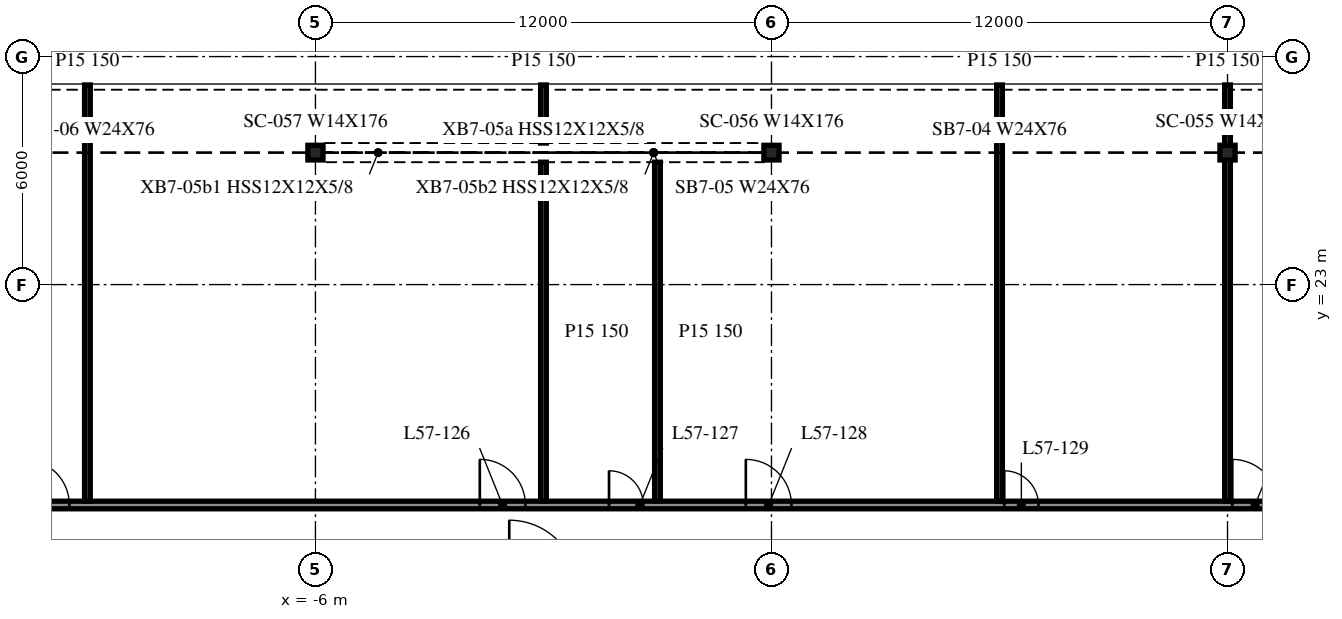
"""IFC4 building model, lengths in metres.
Left out: names, types, materials, properties, quantities, classifications, styles, units other than length and angle.
Written with IfcOpenShell. Run it as: python <this file> out.ifc"""

import sys

from ifc_helpers import new_model, si_unit, direction, frame, frame_2d, origin, origin_2d, place, context, subcontext, project, spatial, rectangle, i_section, extrude, element, fill, save


model = new_model("IFC4")
c1 = context("Model", 3, precision=1e-05, world=origin(), true_north=direction((0.0, 1.0)))
c2 = subcontext(c1, "Body", "Model", "MODEL_VIEW")
j1 = project(units=[si_unit("LENGTHUNIT", "METRE"), si_unit("PLANEANGLEUNIT", "RADIAN")], contexts=[c1])
p1 = place(None, origin())
s1 = spatial("IfcSite", under=j1, at=p1, CompositionType="ELEMENT")
p2 = place(p1, origin())
s2 = spatial("IfcBuilding", under=s1, at=p2, CompositionType="ELEMENT")
p3 = place(p2, frame((0.0, 0.0, 236.2)))
s3 = spatial("IfcBuildingStorey", under=s2, at=p3, CompositionType="ELEMENT", Elevation=236.2)
for number, where, z_axis, x_axis in (
    (1, (18.0, 26.473, -0.34), (0.0, 0.0, 1.0), (1.0, 0.0, 0.0)),
    (2, (6.0, 26.473, -0.34), (0.0, 0.0, 1.0), (1.0, 0.0, 0.0)),
    (3, (-6.0, 26.473, -0.34), (0.0, 0.0, 1.0), (1.0, 0.0, 0.0)),
):
    element("IfcColumn", number, at=place(p3, frame(where, z_axis=z_axis, x_axis=x_axis)), inside=s3, PredefinedType="COLUMN", context=c2, shape_type="SweptSolid", body=[
        extrude(i_section(OverallWidth=0.399, OverallDepth=0.386, WebThickness=0.021, FlangeThickness=0.033, at=origin_2d()), origin(), (0.0, 0.0, 1.0), 3.8),
    ])
p4 = place(p3, frame((-41.975, 17.2, 0.0), z_axis=(0.0, 0.0, 1.0), x_axis=(1.0, 0.0, 0.0)))
e4 = element("IfcWall", 4, at=p4, inside=s3, PredefinedType="PARTITIONING", context=c2, shape_type="SweptSolid", body=[
    extrude(rectangle(XDim=95.95, YDim=0.2, at=frame_2d((47.975, 0.0))), origin(), (0.0, 0.0, 1.0), 3.46),
])
p5 = place(p4, frame((10.7, 0.0, 0.0)))
e5 = element("IfcOpeningElement", 5, at=p5, cuts=e4, PredefinedType="OPENING", context=c2, shape_type="SweptSolid", body=[
    extrude(rectangle(XDim=0.9, YDim=2.1, at=frame_2d((0.45, 1.05))), frame((0.0, 0.11, 0.0), z_axis=(0.0, -1.0, 0.0), x_axis=(1.0, 0.0, 0.0)), (0.0, 0.0, 1.0), 0.22),
])
p6 = place(p4, frame((13.3, 0.0, 0.0)))
e6 = element("IfcOpeningElement", 6, at=p6, cuts=e4, PredefinedType="OPENING", context=c2, shape_type="SweptSolid", body=[
    extrude(rectangle(XDim=1.2, YDim=2.1, at=frame_2d((0.6, 1.05))), frame((0.0, 0.11, 0.0), z_axis=(0.0, -1.0, 0.0), x_axis=(1.0, 0.0, 0.0)), (0.0, 0.0, 1.0), 0.22),
])
p7 = place(p4, frame((22.7, 0.0, 0.0)))
e7 = element("IfcOpeningElement", 7, at=p7, cuts=e4, PredefinedType="OPENING", context=c2, shape_type="SweptSolid", body=[
    extrude(rectangle(XDim=0.9, YDim=2.1, at=frame_2d((0.45, 1.05))), frame((0.0, 0.11, 0.0), z_axis=(0.0, -1.0, 0.0), x_axis=(1.0, 0.0, 0.0)), (0.0, 0.0, 1.0), 0.22),
])
p8 = place(p4, frame((28.3, 0.0, 0.0)))
e8 = element("IfcOpeningElement", 8, at=p8, cuts=e4, PredefinedType="OPENING", context=c2, shape_type="SweptSolid", body=[
    extrude(rectangle(XDim=1.2, YDim=2.1, at=frame_2d((0.6, 1.05))), frame((0.0, 0.11, 0.0), z_axis=(0.0, -1.0, 0.0), x_axis=(1.0, 0.0, 0.0)), (0.0, 0.0, 1.0), 0.22),
])
p9 = place(p4, frame((40.3, 0.0, 0.0)))
e9 = element("IfcOpeningElement", 9, at=p9, cuts=e4, PredefinedType="OPENING", context=c2, shape_type="SweptSolid", body=[
    extrude(rectangle(XDim=1.2, YDim=2.1, at=frame_2d((0.6, 1.05))), frame((0.0, 0.11, 0.0), z_axis=(0.0, -1.0, 0.0), x_axis=(1.0, 0.0, 0.0)), (0.0, 0.0, 1.0), 0.22),
])
p10 = place(p4, frame((43.7, 0.0, 0.0)))
e10 = element("IfcOpeningElement", 10, at=p10, cuts=e4, PredefinedType="OPENING", context=c2, shape_type="SweptSolid", body=[
    extrude(rectangle(XDim=0.9, YDim=2.1, at=frame_2d((0.45, 1.05))), frame((0.0, 0.11, 0.0), z_axis=(0.0, -1.0, 0.0), x_axis=(1.0, 0.0, 0.0)), (0.0, 0.0, 1.0), 0.22),
])
p11 = place(p4, frame((47.3, 0.0, 0.0)))
e11 = element("IfcOpeningElement", 11, at=p11, cuts=e4, PredefinedType="OPENING", context=c2, shape_type="SweptSolid", body=[
    extrude(rectangle(XDim=1.2, YDim=2.1, at=frame_2d((0.6, 1.05))), frame((0.0, 0.11, 0.0), z_axis=(0.0, -1.0, 0.0), x_axis=(1.0, 0.0, 0.0)), (0.0, 0.0, 1.0), 0.22),
])
p12 = place(p4, frame((54.1, 0.0, 0.0)))
e12 = element("IfcOpeningElement", 12, at=p12, cuts=e4, PredefinedType="OPENING", context=c2, shape_type="SweptSolid", body=[
    extrude(rectangle(XDim=0.9, YDim=2.1, at=frame_2d((0.45, 1.05))), frame((0.0, 0.11, 0.0), z_axis=(0.0, -1.0, 0.0), x_axis=(1.0, 0.0, 0.0)), (0.0, 0.0, 1.0), 0.22),
])
p13 = place(p4, frame((60.1, 0.0, 0.0)))
e13 = element("IfcOpeningElement", 13, at=p13, cuts=e4, PredefinedType="OPENING", context=c2, shape_type="SweptSolid", body=[
    extrude(rectangle(XDim=1.2, YDim=2.1, at=frame_2d((0.6, 1.05))), frame((0.0, 0.11, 0.0), z_axis=(0.0, -1.0, 0.0), x_axis=(1.0, 0.0, 0.0)), (0.0, 0.0, 1.0), 0.22),
])
p14 = place(p4, frame((72.1, 0.0, 0.0)))
e14 = element("IfcOpeningElement", 14, at=p14, cuts=e4, PredefinedType="OPENING", context=c2, shape_type="SweptSolid", body=[
    extrude(rectangle(XDim=1.2, YDim=2.1, at=frame_2d((0.6, 1.05))), frame((0.0, 0.11, 0.0), z_axis=(0.0, -1.0, 0.0), x_axis=(1.0, 0.0, 0.0)), (0.0, 0.0, 1.0), 0.22),
])
p15 = place(p4, frame((75.1, 0.0, 0.0)))
e15 = element("IfcOpeningElement", 15, at=p15, cuts=e4, PredefinedType="OPENING", context=c2, shape_type="SweptSolid", body=[
    extrude(rectangle(XDim=0.9, YDim=2.1, at=frame_2d((0.45, 1.05))), frame((0.0, 0.11, 0.0), z_axis=(0.0, -1.0, 0.0), x_axis=(1.0, 0.0, 0.0)), (0.0, 0.0, 1.0), 0.22),
])
p16 = place(p4, frame((84.1, 0.0, 0.0)))
e16 = element("IfcOpeningElement", 16, at=p16, cuts=e4, PredefinedType="OPENING", context=c2, shape_type="SweptSolid", body=[
    extrude(rectangle(XDim=1.2, YDim=2.1, at=frame_2d((0.6, 1.05))), frame((0.0, 0.11, 0.0), z_axis=(0.0, -1.0, 0.0), x_axis=(1.0, 0.0, 0.0)), (0.0, 0.0, 1.0), 0.22),
])
p17 = place(p4, frame((90.1, 0.0, 0.0)))
e17 = element("IfcOpeningElement", 17, at=p17, cuts=e4, PredefinedType="OPENING", context=c2, shape_type="SweptSolid", body=[
    extrude(rectangle(XDim=0.9, YDim=2.1, at=frame_2d((0.45, 1.05))), frame((0.0, 0.11, 0.0), z_axis=(0.0, -1.0, 0.0), x_axis=(1.0, 0.0, 0.0)), (0.0, 0.0, 1.0), 0.22),
])
p18 = place(p3, frame((-12.0, 17.3, 0.0), z_axis=(0.0, 0.0, 1.0), x_axis=(0.0, 1.0, 0.0)))
e18 = element("IfcWall", 18, at=p18, inside=s3, PredefinedType="PARTITIONING", context=c2, shape_type="SweptSolid", body=[
    extrude(rectangle(XDim=10.953, YDim=0.15, at=frame_2d((5.477, 0.0))), origin(), (0.0, 0.0, 1.0), 3.46),
])
p19 = place(p3, frame((0.0, 17.3, 0.0), z_axis=(0.0, 0.0, 1.0), x_axis=(0.0, 1.0, 0.0)))
e19 = element("IfcWall", 19, at=p19, inside=s3, PredefinedType="PARTITIONING", context=c2, shape_type="SweptSolid", body=[
    extrude(rectangle(XDim=8.921, YDim=0.15, at=frame_2d((4.46, 0.0))), origin(), (0.0, 0.0, 1.0), 3.46),
])
p20 = place(p3, frame((0.0, 26.725, 0.0), z_axis=(0.0, 0.0, 1.0), x_axis=(0.0, 1.0, 0.0)))
e20 = element("IfcWall", 20, at=p20, inside=s3, PredefinedType="PARTITIONING", context=c2, shape_type="SweptSolid", body=[
    extrude(rectangle(XDim=1.528, YDim=0.15, at=frame_2d((0.764, 0.0))), origin(), (0.0, 0.0, 1.0), 3.46),
])
p21 = place(p3, frame((3.0, 17.3, 0.0), z_axis=(0.0, 0.0, 1.0), x_axis=(0.0, 1.0, 0.0)))
e21 = element("IfcWall", 21, at=p21, inside=s3, PredefinedType="PARTITIONING", context=c2, shape_type="SweptSolid", body=[
    extrude(rectangle(XDim=8.921, YDim=0.15, at=frame_2d((4.46, 0.0))), origin(), (0.0, 0.0, 1.0), 3.46),
])
for number, where, z_axis, x_axis in (
    (22, (12.0, 17.3, 0.0), (0.0, 0.0, 1.0), (0.0, 1.0, 0.0)),
    (23, (18.0, 17.3, 0.0), (0.0, 0.0, 1.0), (0.0, 1.0, 0.0)),
):
    element("IfcWall", number, at=place(p3, frame(where, z_axis=z_axis, x_axis=x_axis)), inside=s3, PredefinedType="PARTITIONING", context=c2, shape_type="SweptSolid", body=[
        extrude(rectangle(XDim=10.953, YDim=0.15, at=frame_2d((5.477, 0.0))), origin(), (0.0, 0.0, 1.0), 3.46),
    ])
p22 = place(p8, origin())
e24 = element("IfcDoor", 24, at=p22, inside=s3, OperationType="SINGLE_SWING_LEFT", PredefinedType="DOOR", context=c2, shape_type="SweptSolid", body=[
    extrude(rectangle(XDim=1.2, YDim=2.1, at=frame_2d((0.6, 1.05))), frame((0.0, 0.025, 0.0), z_axis=(0.0, -1.0, 0.0), x_axis=(1.0, 0.0, 0.0)), (0.0, 0.0, 1.0), 0.05),
])
fill(e8, e24)
p23 = place(p9, origin())
e25 = element("IfcDoor", 25, at=p23, inside=s3, OperationType="SINGLE_SWING_LEFT", PredefinedType="DOOR", context=c2, shape_type="SweptSolid", body=[
    extrude(rectangle(XDim=1.2, YDim=2.1, at=frame_2d((0.6, 1.05))), frame((0.0, 0.025, 0.0), z_axis=(0.0, -1.0, 0.0), x_axis=(1.0, 0.0, 0.0)), (0.0, 0.0, 1.0), 0.05),
])
fill(e9, e25)
p24 = place(p10, origin())
e26 = element("IfcDoor", 26, at=p24, inside=s3, OperationType="SINGLE_SWING_LEFT", PredefinedType="DOOR", context=c2, shape_type="SweptSolid", body=[
    extrude(rectangle(XDim=0.9, YDim=2.1, at=frame_2d((0.45, 1.05))), frame((0.0, 0.025, 0.0), z_axis=(0.0, -1.0, 0.0), x_axis=(1.0, 0.0, 0.0)), (0.0, 0.0, 1.0), 0.05),
])
fill(e10, e26)
p25 = place(p11, origin())
e27 = element("IfcDoor", 27, at=p25, inside=s3, OperationType="SINGLE_SWING_RIGHT", PredefinedType="DOOR", context=c2, shape_type="SweptSolid", body=[
    extrude(rectangle(XDim=1.2, YDim=2.1, at=frame_2d((0.6, 1.05))), frame((0.0, 0.025, 0.0), z_axis=(0.0, -1.0, 0.0), x_axis=(1.0, 0.0, 0.0)), (0.0, 0.0, 1.0), 0.05),
])
fill(e11, e27)
p26 = place(p12, origin())
e28 = element("IfcDoor", 28, at=p26, inside=s3, OperationType="SINGLE_SWING_RIGHT", PredefinedType="DOOR", context=c2, shape_type="SweptSolid", body=[
    extrude(rectangle(XDim=0.9, YDim=2.1, at=frame_2d((0.45, 1.05))), frame((0.0, 0.025, 0.0), z_axis=(0.0, -1.0, 0.0), x_axis=(1.0, 0.0, 0.0)), (0.0, 0.0, 1.0), 0.05),
])
fill(e12, e28)
p27 = place(p13, origin())
e29 = element("IfcDoor", 29, at=p27, inside=s3, OperationType="SINGLE_SWING_RIGHT", PredefinedType="DOOR", context=c2, shape_type="SweptSolid", body=[
    extrude(rectangle(XDim=1.2, YDim=2.1, at=frame_2d((0.6, 1.05))), frame((0.0, 0.025, 0.0), z_axis=(0.0, -1.0, 0.0), x_axis=(1.0, 0.0, 0.0)), (0.0, 0.0, 1.0), 0.05),
])
fill(e13, e29)
save(model, sys.argv[1])
